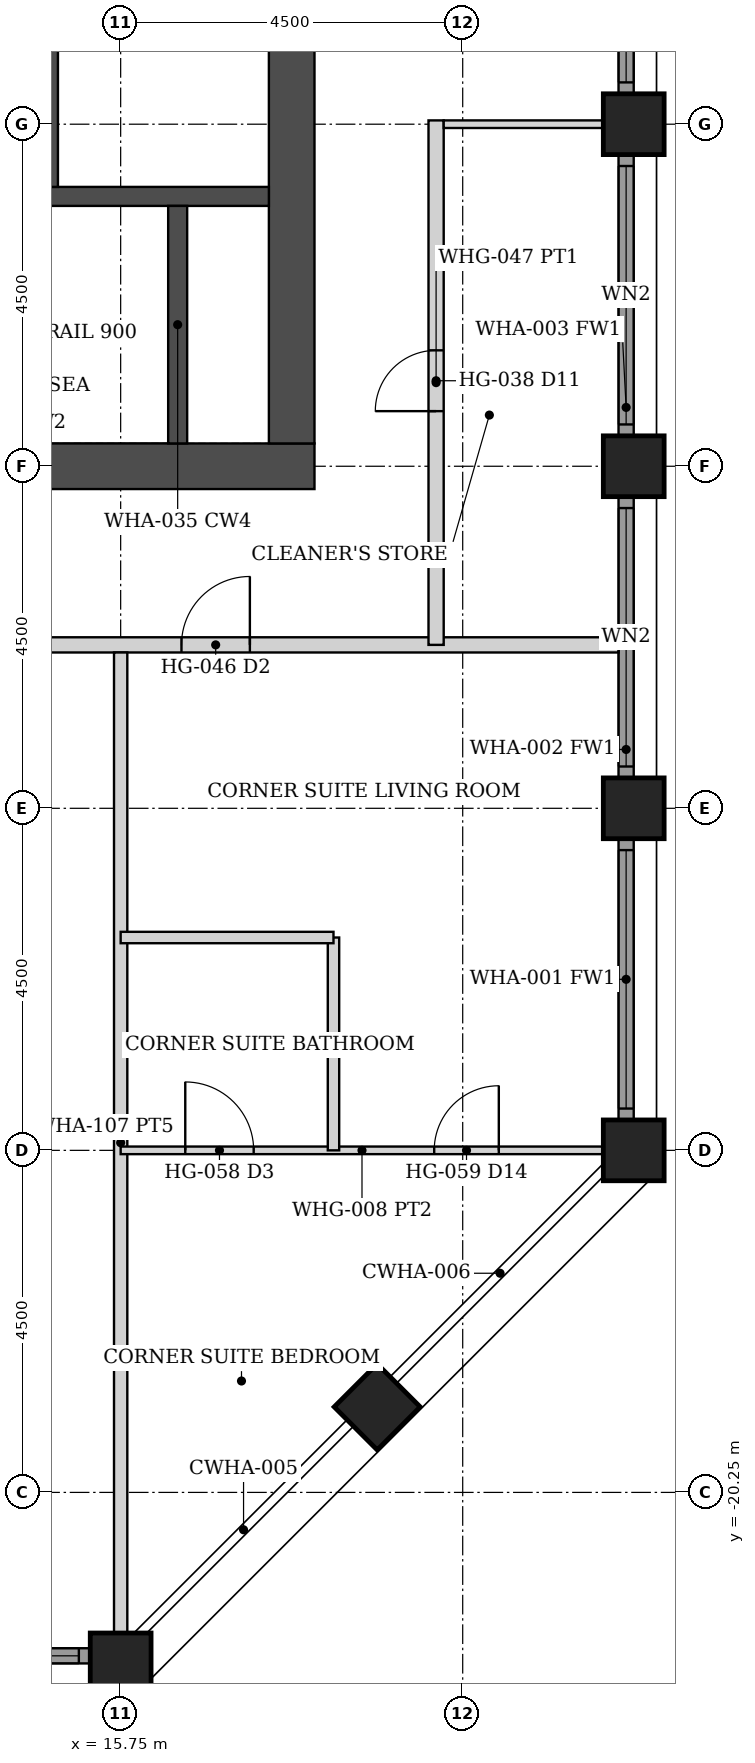
"""IFC4 building model, lengths in metres.
Left out: names, types, materials, properties, quantities, classifications, styles, units other than length and angle.
Written with IfcOpenShell. Run it as: python <this file> out.ifc"""

import sys

from ifc_helpers import new_model, si_unit, direction, frame, frame_2d, origin, origin_2d, place, context, subcontext, project, spatial, rectangle, hollow_rectangle, extrude, element, fill, save


model = new_model("IFC4")
c1 = context("Model", 3, precision=1e-05, world=origin(), true_north=direction((0.0, 1.0)))
c2 = subcontext(c1, "Body", "Model", "MODEL_VIEW")
j1 = project(units=[si_unit("LENGTHUNIT", "METRE"), si_unit("PLANEANGLEUNIT", "RADIAN")], contexts=[c1])
p1 = place(None, origin())
s1 = spatial("IfcSite", under=j1, at=p1, CompositionType="ELEMENT")
p2 = place(p1, origin())
s2 = spatial("IfcBuilding", under=s1, at=p2, CompositionType="ELEMENT")
p3 = place(p2, frame((0.0, 0.0, 183.2)))
s3 = spatial("IfcBuildingStorey", under=s2, at=p3, CompositionType="ELEMENT", Elevation=183.2)
for number, where, z_axis, x_axis in (
    (1, (22.5, -15.75, 0.0), (0.0, 0.0, 1.0), (1.0, 0.0, 0.0)),
    (2, (22.5, -11.25, 0.0), (0.0, 0.0, 1.0), (1.0, 0.0, 0.0)),
    (3, (22.5, -6.75, 0.0), (0.0, 0.0, 1.0), (1.0, 0.0, 0.0)),
    (4, (22.5, -2.25, 0.0), (0.0, 0.0, 1.0), (1.0, 0.0, 0.0)),
    (5, (15.75, -22.5, 0.0), (0.0, 0.0, 1.0), (0.0, 1.0, 0.0)),
    (6, (19.125, -19.125, 0.0), (0.0, 0.0, 1.0), (0.707, -0.707, 0.0)),
):
    element("IfcColumn", number, at=place(p3, frame(where, z_axis=z_axis, x_axis=x_axis)), inside=s3, PredefinedType="COLUMN", context=c2, shape_type="SweptSolid", body=[
        extrude(hollow_rectangle(XDim=0.8, YDim=0.8, WallThickness=0.045, at=origin_2d()), origin(), (0.0, 0.0, 1.0), 3.6),
    ])
p4 = place(p3, frame((8.7, -6.75, 0.0), z_axis=(0.0, 0.0, 1.0), x_axis=(1.0, 0.0, 0.0)))
e7 = element("IfcWall", 7, at=p4, inside=s3, PredefinedType="SHEAR", context=c2, shape_type="SweptSolid", body=[
    extrude(rectangle(XDim=9.6, YDim=0.6, at=frame_2d((4.8, 0.0))), origin(), (0.0, 0.0, 1.0), 3.6),
])
p5 = place(p3, frame((18.0, -6.45, 0.0), z_axis=(0.0, 0.0, 1.0), x_axis=(0.0, 1.0, 0.0)))
e8 = element("IfcWall", 8, at=p5, inside=s3, PredefinedType="SHEAR", context=c2, shape_type="SweptSolid", body=[
    extrude(rectangle(XDim=12.9, YDim=0.6, at=frame_2d((6.45, 0.0))), origin(), (0.0, 0.0, 1.0), 3.6),
])
p6 = place(p3, frame((9.3, -3.2, 0.0), z_axis=(0.0, 0.0, 1.0), x_axis=(1.0, 0.0, 0.0)))
e9 = element("IfcWall", 9, at=p6, inside=s3, PredefinedType="SHEAR", context=c2, shape_type="SweptSolid", body=[
    extrude(rectangle(XDim=8.4, YDim=0.25, at=frame_2d((4.2, 0.0))), origin(), (0.0, 0.0, 1.0), 3.6),
])
p7 = place(p6, frame((0.15, 0.0, 0.0)))
e10 = element("IfcOpeningElement", 10, at=p7, cuts=e9, PredefinedType="OPENING", context=c2, shape_type="SweptSolid", body=[
    extrude(rectangle(XDim=1.0, YDim=2.1, at=frame_2d((0.5, 1.05))), frame((0.0, 0.135, 0.0), z_axis=(0.0, -1.0, 0.0), x_axis=(1.0, 0.0, 0.0)), (0.0, 0.0, 1.0), 0.27),
])
p8 = place(p3, frame((16.5, -6.45, 0.0), z_axis=(0.0, 0.0, 1.0), x_axis=(0.0, 1.0, 0.0)))
e11 = element("IfcWall", 11, at=p8, inside=s3, PredefinedType="SHEAR", context=c2, shape_type="SweptSolid", body=[
    extrude(rectangle(XDim=3.125, YDim=0.25, at=frame_2d((1.562, 0.0))), origin(), (0.0, 0.0, 1.0), 3.6),
])
p9 = place(p3, frame((14.8, -3.075, 0.0), z_axis=(0.0, 0.0, 1.0), x_axis=(0.0, 1.0, 0.0)))
e12 = element("IfcWall", 12, at=p9, inside=s3, PredefinedType="SHEAR", context=c2, shape_type="SweptSolid", body=[
    extrude(rectangle(XDim=6.15, YDim=0.25, at=frame_2d((3.075, 0.0))), origin(), (0.0, 0.0, 1.0), 3.6),
])
p10 = place(p9, frame((2.4, 0.0, 0.0)))
e13 = element("IfcOpeningElement", 13, at=p10, cuts=e12, PredefinedType="OPENING", context=c2, shape_type="SweptSolid", body=[
    extrude(rectangle(XDim=1.1, YDim=2.1, at=frame_2d((0.55, 1.05))), frame((0.0, 0.135, 0.0), z_axis=(0.0, -1.0, 0.0), x_axis=(1.0, 0.0, 0.0)), (0.0, 0.0, 1.0), 0.27),
])
p11 = place(p9, frame((4.575, 0.0, 0.0)))
e14 = element("IfcOpeningElement", 14, at=p11, cuts=e12, PredefinedType="OPENING", context=c2, shape_type="SweptSolid", body=[
    extrude(rectangle(XDim=1.1, YDim=2.1, at=frame_2d((0.55, 1.05))), frame((0.0, 0.135, 0.0), z_axis=(0.0, -1.0, 0.0), x_axis=(1.0, 0.0, 0.0)), (0.0, 0.0, 1.0), 0.27),
])
p12 = place(p3, frame((11.655, -22.4, 0.0), z_axis=(0.0, 0.0, 1.0), x_axis=(1.0, 0.0, 0.0)))
e15 = element("IfcWall", 15, at=p12, inside=s3, PredefinedType="SOLIDWALL", context=c2, shape_type="SweptSolid", body=[
    extrude(rectangle(XDim=3.69, YDim=0.2, at=frame_2d((1.845, 0.0))), origin(), (0.0, 0.0, 1.0), 2.479),
])
p13 = place(p12, frame((0.145, 0.0, 0.3)))
e16 = element("IfcOpeningElement", 16, at=p13, cuts=e15, PredefinedType="OPENING", context=c2, shape_type="SweptSolid", body=[
    extrude(rectangle(XDim=3.4, YDim=2.029, at=frame_2d((1.7, 1.015))), frame((0.0, 0.11, 0.0), z_axis=(0.0, -1.0, 0.0), x_axis=(1.0, 0.0, 0.0)), (0.0, 0.0, 1.0), 0.22),
])
p14 = place(p3, frame((22.4, -15.345, 0.0), z_axis=(0.0, 0.0, 1.0), x_axis=(0.0, 1.0, 0.0)))
e17 = element("IfcWall", 17, at=p14, inside=s3, PredefinedType="SOLIDWALL", context=c2, shape_type="SweptSolid", body=[
    extrude(rectangle(XDim=3.69, YDim=0.2, at=frame_2d((1.845, 0.0))), origin(), (0.0, 0.0, 1.0), 2.479),
])
p15 = place(p14, frame((0.145, 0.0, 0.3)))
e18 = element("IfcOpeningElement", 18, at=p15, cuts=e17, PredefinedType="OPENING", context=c2, shape_type="SweptSolid", body=[
    extrude(rectangle(XDim=3.4, YDim=2.029, at=frame_2d((1.7, 1.015))), frame((0.0, 0.11, 0.0), z_axis=(0.0, -1.0, 0.0), x_axis=(1.0, 0.0, 0.0)), (0.0, 0.0, 1.0), 0.22),
])
p16 = place(p3, frame((22.4, -10.845, 0.0), z_axis=(0.0, 0.0, 1.0), x_axis=(0.0, 1.0, 0.0)))
e19 = element("IfcWall", 19, at=p16, inside=s3, PredefinedType="SOLIDWALL", context=c2, shape_type="SweptSolid", body=[
    extrude(rectangle(XDim=3.69, YDim=0.2, at=frame_2d((1.845, 0.0))), origin(), (0.0, 0.0, 1.0), 2.479),
])
p17 = place(p16, frame((0.145, 0.0, 0.3)))
e20 = element("IfcOpeningElement", 20, at=p17, cuts=e19, PredefinedType="OPENING", context=c2, shape_type="SweptSolid", body=[
    extrude(rectangle(XDim=3.4, YDim=2.029, at=frame_2d((1.7, 1.015))), frame((0.0, 0.11, 0.0), z_axis=(0.0, -1.0, 0.0), x_axis=(1.0, 0.0, 0.0)), (0.0, 0.0, 1.0), 0.22),
])
p18 = place(p3, frame((22.4, -6.345, 0.0), z_axis=(0.0, 0.0, 1.0), x_axis=(0.0, 1.0, 0.0)))
e21 = element("IfcWall", 21, at=p18, inside=s3, PredefinedType="SOLIDWALL", context=c2, shape_type="SweptSolid", body=[
    extrude(rectangle(XDim=3.69, YDim=0.2, at=frame_2d((1.845, 0.0))), origin(), (0.0, 0.0, 1.0), 2.479),
])
p19 = place(p18, frame((0.145, 0.0, 0.3)))
e22 = element("IfcOpeningElement", 22, at=p19, cuts=e21, PredefinedType="OPENING", context=c2, shape_type="SweptSolid", body=[
    extrude(rectangle(XDim=3.4, YDim=2.029, at=frame_2d((1.7, 1.015))), frame((0.0, 0.11, 0.0), z_axis=(0.0, -1.0, 0.0), x_axis=(1.0, 0.0, 0.0)), (0.0, 0.0, 1.0), 0.22),
])
p20 = place(p3, frame((22.4, -1.845, 0.0), z_axis=(0.0, 0.0, 1.0), x_axis=(0.0, 1.0, 0.0)))
e23 = element("IfcWall", 23, at=p20, inside=s3, PredefinedType="SOLIDWALL", context=c2, shape_type="SweptSolid", body=[
    extrude(rectangle(XDim=3.69, YDim=0.2, at=frame_2d((1.845, 0.0))), origin(), (0.0, 0.0, 1.0), 2.479),
])
p21 = place(p20, frame((0.145, 0.0, 0.3)))
e24 = element("IfcOpeningElement", 24, at=p21, cuts=e23, PredefinedType="OPENING", context=c2, shape_type="SweptSolid", body=[
    extrude(rectangle(XDim=3.4, YDim=2.029, at=frame_2d((1.7, 1.015))), frame((0.0, 0.11, 0.0), z_axis=(0.0, -1.0, 0.0), x_axis=(1.0, 0.0, 0.0)), (0.0, 0.0, 1.0), 0.22),
])
p22 = place(p3, frame((-22.3, -9.1, 0.0), z_axis=(0.0, 0.0, 1.0), x_axis=(1.0, 0.0, 0.0)))
e25 = element("IfcWall", 25, at=p22, inside=s3, PredefinedType="PARTITIONING", context=c2, shape_type="SweptSolid", body=[
    extrude(rectangle(XDim=44.6, YDim=0.2, at=frame_2d((22.3, 0.0))), origin(), (0.0, 0.0, 1.0), 2.473),
])
p23 = place(p22, frame((11.35, 0.0, 0.0)))
e26 = element("IfcOpeningElement", 26, at=p23, cuts=e25, PredefinedType="OPENING", context=c2, shape_type="SweptSolid", body=[
    extrude(rectangle(XDim=0.9, YDim=2.1, at=frame_2d((0.45, 1.05))), frame((0.0, 0.11, 0.0), z_axis=(0.0, -1.0, 0.0), x_axis=(1.0, 0.0, 0.0)), (0.0, 0.0, 1.0), 0.22),
])
p24 = place(p22, frame((15.75, 0.0, 0.0)))
e27 = element("IfcOpeningElement", 27, at=p24, cuts=e25, PredefinedType="OPENING", context=c2, shape_type="SweptSolid", body=[
    extrude(rectangle(XDim=0.9, YDim=2.1, at=frame_2d((0.45, 1.05))), frame((0.0, 0.11, 0.0), z_axis=(0.0, -1.0, 0.0), x_axis=(1.0, 0.0, 0.0)), (0.0, 0.0, 1.0), 0.22),
])
p25 = place(p22, frame((23.45, 0.0, 0.0)))
e28 = element("IfcOpeningElement", 28, at=p25, cuts=e25, PredefinedType="OPENING", context=c2, shape_type="SweptSolid", body=[
    extrude(rectangle(XDim=0.9, YDim=2.1, at=frame_2d((0.45, 1.05))), frame((0.0, 0.11, 0.0), z_axis=(0.0, -1.0, 0.0), x_axis=(1.0, 0.0, 0.0)), (0.0, 0.0, 1.0), 0.22),
])
p26 = place(p22, frame((24.75, 0.0, 0.0)))
e29 = element("IfcOpeningElement", 29, at=p26, cuts=e25, PredefinedType="OPENING", context=c2, shape_type="SweptSolid", body=[
    extrude(rectangle(XDim=0.9, YDim=2.1, at=frame_2d((0.45, 1.05))), frame((0.0, 0.11, 0.0), z_axis=(0.0, -1.0, 0.0), x_axis=(1.0, 0.0, 0.0)), (0.0, 0.0, 1.0), 0.22),
])
p27 = place(p22, frame((29.25, 0.0, 0.0)))
e30 = element("IfcOpeningElement", 30, at=p27, cuts=e25, PredefinedType="OPENING", context=c2, shape_type="SweptSolid", body=[
    extrude(rectangle(XDim=0.9, YDim=2.1, at=frame_2d((0.45, 1.05))), frame((0.0, 0.11, 0.0), z_axis=(0.0, -1.0, 0.0), x_axis=(1.0, 0.0, 0.0)), (0.0, 0.0, 1.0), 0.22),
])
p28 = place(p22, frame((38.85, 0.0, 0.0)))
e31 = element("IfcOpeningElement", 31, at=p28, cuts=e25, PredefinedType="OPENING", context=c2, shape_type="SweptSolid", body=[
    extrude(rectangle(XDim=0.9, YDim=2.1, at=frame_2d((0.45, 1.05))), frame((0.0, 0.11, 0.0), z_axis=(0.0, -1.0, 0.0), x_axis=(1.0, 0.0, 0.0)), (0.0, 0.0, 1.0), 0.22),
])
p29 = place(p22, frame((4.85, 0.0, 0.0)))
e32 = element("IfcOpeningElement", 32, at=p29, cuts=e25, PredefinedType="OPENING", context=c2, shape_type="SweptSolid", body=[
    extrude(rectangle(XDim=0.9, YDim=2.1, at=frame_2d((0.45, 1.05))), frame((0.0, 0.11, 0.0), z_axis=(0.0, -1.0, 0.0), x_axis=(1.0, 0.0, 0.0)), (0.0, 0.0, 1.0), 0.22),
])
p30 = place(p3, frame((19.9, -9.1, 0.0), z_axis=(0.0, 0.0, 1.0), x_axis=(0.0, 1.0, 0.0)))
e33 = element("IfcWall", 33, at=p30, inside=s3, PredefinedType="PARTITIONING", context=c2, shape_type="SweptSolid", body=[
    extrude(rectangle(XDim=6.9, YDim=0.2, at=frame_2d((3.45, 0.0))), origin(), (0.0, 0.0, 1.0), 2.473),
])
p31 = place(p30, frame((3.075, 0.0, 0.0)))
e34 = element("IfcOpeningElement", 34, at=p31, cuts=e33, PredefinedType="OPENING", context=c2, shape_type="SweptSolid", body=[
    extrude(rectangle(XDim=0.8, YDim=2.1, at=frame_2d((0.4, 1.05))), frame((0.0, 0.11, 0.0), z_axis=(0.0, -1.0, 0.0), x_axis=(1.0, 0.0, 0.0)), (0.0, 0.0, 1.0), 0.22),
])
p32 = place(p3, frame((15.75, -22.1, 0.0), z_axis=(0.0, 0.0, 1.0), x_axis=(0.0, 1.0, 0.0)))
e35 = element("IfcWall", 35, at=p32, inside=s3, PredefinedType="PARTITIONING", context=c2, shape_type="SweptSolid", body=[
    extrude(rectangle(XDim=12.9, YDim=0.175, at=frame_2d((6.45, 0.0))), origin(), (0.0, 0.0, 1.0), 2.473),
])
p33 = place(p3, frame((15.75, -15.75, 0.0), z_axis=(0.0, 0.0, 1.0), x_axis=(1.0, 0.0, 0.0)))
e36 = element("IfcWall", 36, at=p33, inside=s3, PredefinedType="PARTITIONING", context=c2, shape_type="SweptSolid", body=[
    extrude(rectangle(XDim=6.35, YDim=0.1, at=frame_2d((3.175, 0.0))), origin(), (0.0, 0.0, 1.0), 2.473),
])
p34 = place(p33, frame((4.125, 0.0, 0.0)))
e37 = element("IfcOpeningElement", 37, at=p34, cuts=e36, PredefinedType="OPENING", context=c2, shape_type="SweptSolid", body=[
    extrude(rectangle(XDim=0.85, YDim=2.1, at=frame_2d((0.425, 1.05))), frame((0.0, 0.06, 0.0), z_axis=(0.0, -1.0, 0.0), x_axis=(1.0, 0.0, 0.0)), (0.0, 0.0, 1.0), 0.12),
])
p35 = place(p33, frame((0.85, 0.0, 0.0)))
e38 = element("IfcOpeningElement", 38, at=p35, cuts=e36, PredefinedType="OPENING", context=c2, shape_type="SweptSolid", body=[
    extrude(rectangle(XDim=0.9, YDim=2.1, at=frame_2d((0.45, 1.05))), frame((0.0, 0.06, 0.0), z_axis=(0.0, -1.0, 0.0), x_axis=(1.0, 0.0, 0.0)), (0.0, 0.0, 1.0), 0.12),
])
for number, where, z_axis, x_axis in (
    (39, (18.55, -15.75, 0.0), (0.0, 0.0, 1.0), (0.0, 1.0, 0.0)),
    (40, (15.75, -12.95, 0.0), (0.0, 0.0, 1.0), (1.0, 0.0, 0.0)),
):
    element("IfcWall", number, at=place(p3, frame(where, z_axis=z_axis, x_axis=x_axis)), inside=s3, PredefinedType="PARTITIONING", context=c2, shape_type="SweptSolid", body=[
        extrude(rectangle(XDim=2.8, YDim=0.15, at=frame_2d((1.4, 0.0))), origin(), (0.0, 0.0, 1.0), 2.473),
    ])
p36 = place(p3, frame((20.0, -2.25, 0.0), z_axis=(0.0, 0.0, 1.0), x_axis=(1.0, 0.0, 0.0)))
e41 = element("IfcWall", 41, at=p36, inside=s3, PredefinedType="PARTITIONING", context=c2, shape_type="SweptSolid", body=[
    extrude(rectangle(XDim=2.1, YDim=0.1, at=frame_2d((1.05, 0.0))), origin(), (0.0, 0.0, 1.0), 2.473),
])
p37 = place(p13, origin())
e42 = element("IfcWindow", 42, at=p37, inside=s3, PartitioningType="SINGLE_PANEL", PredefinedType="WINDOW", context=c2, shape_type="SweptSolid", body=[
    extrude(rectangle(XDim=3.4, YDim=2.029, at=frame_2d((1.7, 1.015))), frame((0.0, 0.03, 0.0), z_axis=(0.0, -1.0, 0.0), x_axis=(1.0, 0.0, 0.0)), (0.0, 0.0, 1.0), 0.06),
])
fill(e16, e42)
p38 = place(p15, origin())
e43 = element("IfcWindow", 43, at=p38, inside=s3, PartitioningType="SINGLE_PANEL", PredefinedType="WINDOW", context=c2, shape_type="SweptSolid", body=[
    extrude(rectangle(XDim=3.4, YDim=2.029, at=frame_2d((1.7, 1.015))), frame((0.0, 0.03, 0.0), z_axis=(0.0, -1.0, 0.0), x_axis=(1.0, 0.0, 0.0)), (0.0, 0.0, 1.0), 0.06),
])
fill(e18, e43)
p39 = place(p17, origin())
e44 = element("IfcWindow", 44, at=p39, inside=s3, PartitioningType="SINGLE_PANEL", PredefinedType="WINDOW", context=c2, shape_type="SweptSolid", body=[
    extrude(rectangle(XDim=3.4, YDim=2.029, at=frame_2d((1.7, 1.015))), frame((0.0, 0.03, 0.0), z_axis=(0.0, -1.0, 0.0), x_axis=(1.0, 0.0, 0.0)), (0.0, 0.0, 1.0), 0.06),
])
fill(e20, e44)
p40 = place(p19, origin())
e45 = element("IfcWindow", 45, at=p40, inside=s3, PartitioningType="SINGLE_PANEL", PredefinedType="WINDOW", context=c2, shape_type="SweptSolid", body=[
    extrude(rectangle(XDim=3.4, YDim=2.029, at=frame_2d((1.7, 1.015))), frame((0.0, 0.03, 0.0), z_axis=(0.0, -1.0, 0.0), x_axis=(1.0, 0.0, 0.0)), (0.0, 0.0, 1.0), 0.06),
])
fill(e22, e45)
p41 = place(p21, origin())
e46 = element("IfcWindow", 46, at=p41, inside=s3, PartitioningType="SINGLE_PANEL", PredefinedType="WINDOW", context=c2, shape_type="SweptSolid", body=[
    extrude(rectangle(XDim=3.4, YDim=2.029, at=frame_2d((1.7, 1.015))), frame((0.0, 0.03, 0.0), z_axis=(0.0, -1.0, 0.0), x_axis=(1.0, 0.0, 0.0)), (0.0, 0.0, 1.0), 0.06),
])
fill(e24, e46)
p42 = place(p28, origin())
e47 = element("IfcDoor", 47, at=p42, inside=s3, OperationType="SINGLE_SWING_RIGHT", PredefinedType="DOOR", context=c2, shape_type="SweptSolid", body=[
    extrude(rectangle(XDim=0.9, YDim=2.1, at=frame_2d((0.45, 1.05))), frame((0.0, 0.025, 0.0), z_axis=(0.0, -1.0, 0.0), x_axis=(1.0, 0.0, 0.0)), (0.0, 0.0, 1.0), 0.05),
])
fill(e31, e47)
p43 = place(p34, origin())
e48 = element("IfcDoor", 48, at=p43, inside=s3, OperationType="SINGLE_SWING_RIGHT", PredefinedType="DOOR", context=c2, shape_type="SweptSolid", body=[
    extrude(rectangle(XDim=0.85, YDim=2.1, at=frame_2d((0.425, 1.05))), frame((0.0, 0.025, 0.0), z_axis=(0.0, -1.0, 0.0), x_axis=(1.0, 0.0, 0.0)), (0.0, 0.0, 1.0), 0.05),
])
fill(e37, e48)
p44 = place(p35, origin())
e49 = element("IfcDoor", 49, at=p44, inside=s3, OperationType="SINGLE_SWING_LEFT", PredefinedType="DOOR", context=c2, shape_type="SweptSolid", body=[
    extrude(rectangle(XDim=0.9, YDim=2.1, at=frame_2d((0.45, 1.05))), frame((0.0, 0.025, 0.0), z_axis=(0.0, -1.0, 0.0), x_axis=(1.0, 0.0, 0.0)), (0.0, 0.0, 1.0), 0.05),
])
fill(e38, e49)
p45 = place(p31, origin())
e50 = element("IfcDoor", 50, at=p45, inside=s3, OperationType="SINGLE_SWING_LEFT", PredefinedType="DOOR", context=c2, shape_type="SweptSolid", body=[
    extrude(rectangle(XDim=0.8, YDim=2.1, at=frame_2d((0.4, 1.05))), frame((0.0, 0.025, 0.0), z_axis=(0.0, -1.0, 0.0), x_axis=(1.0, 0.0, 0.0)), (0.0, 0.0, 1.0), 0.05),
])
fill(e34, e50)
save(model, sys.argv[1])
